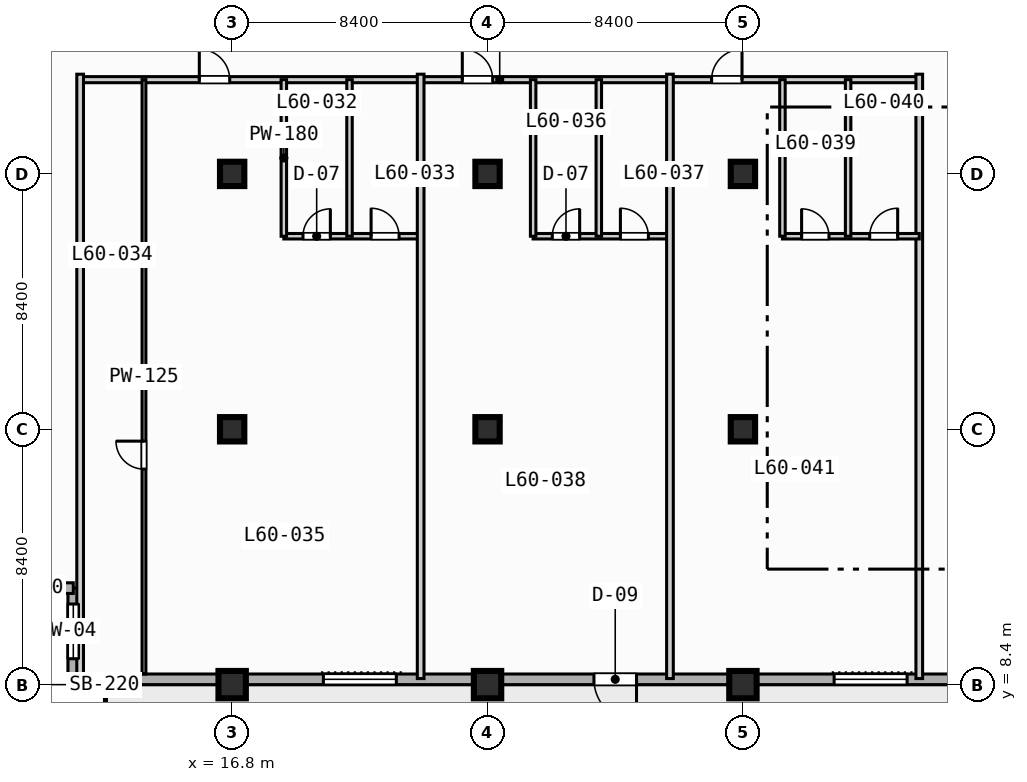
"""IFC4 building model, lengths in metres.
Left out: names, types, materials, properties, quantities, classifications, styles, units other than length and angle.
Written with IfcOpenShell. Run it as: python <this file> out.ifc"""

import sys

from ifc_helpers import new_model, si_unit, direction, frame, frame_2d, origin, origin_2d, place, context, subcontext, project, spatial, rectangle, extrude, element, fill, save


model = new_model("IFC4")
c1 = context("Model", 3, precision=1e-05, world=origin(), true_north=direction((0.0, 1.0)))
c2 = subcontext(c1, "Body", "Model", "MODEL_VIEW")
j1 = project(units=[si_unit("LENGTHUNIT", "METRE"), si_unit("PLANEANGLEUNIT", "RADIAN")], contexts=[c1])
p1 = place(None, origin())
s1 = spatial("IfcSite", under=j1, at=p1, CompositionType="ELEMENT")
p2 = place(p1, origin())
s2 = spatial("IfcBuilding", under=s1, at=p2, CompositionType="ELEMENT")
p3 = place(p2, frame((0.0, 0.0, 245.3)))
s3 = spatial("IfcBuildingStorey", under=s2, at=p3, CompositionType="ELEMENT", Elevation=245.3)
p4 = place(p3, frame((16.8, 8.4, 0.0), z_axis=(0.0, 0.0, 1.0), x_axis=(1.0, 0.0, 0.0)))
e1 = element("IfcColumn", 1, at=p4, inside=s3, PredefinedType="COLUMN", context=c2, shape_type="SweptSolid", body=[
    extrude(rectangle(XDim=0.9, YDim=0.9, at=origin_2d()), origin(), (0.0, 0.0, 1.0), 3.7),
])
for number, where, z_axis, x_axis in (
    (2, (16.8, 16.8, 0.0), (0.0, 0.0, 1.0), (1.0, 0.0, 0.0)),
    (3, (16.8, 25.2, 0.0), (0.0, 0.0, 1.0), (1.0, 0.0, 0.0)),
):
    element("IfcColumn", number, at=place(p3, frame(where, z_axis=z_axis, x_axis=x_axis)), inside=s3, PredefinedType="COLUMN", context=c2, shape_type="SweptSolid", body=[
        extrude(rectangle(XDim=0.8, YDim=0.8, at=origin_2d()), origin(), (0.0, 0.0, 1.0), 3.7),
    ])
p5 = place(p3, frame((25.2, 8.4, 0.0), z_axis=(0.0, 0.0, 1.0), x_axis=(1.0, 0.0, 0.0)))
e4 = element("IfcColumn", 4, at=p5, inside=s3, PredefinedType="COLUMN", context=c2, shape_type="SweptSolid", body=[
    extrude(rectangle(XDim=0.9, YDim=0.9, at=origin_2d()), origin(), (0.0, 0.0, 1.0), 3.7),
])
for number, where, z_axis, x_axis in (
    (5, (25.2, 16.8, 0.0), (0.0, 0.0, 1.0), (1.0, 0.0, 0.0)),
    (6, (25.2, 25.2, 0.0), (0.0, 0.0, 1.0), (1.0, 0.0, 0.0)),
):
    element("IfcColumn", number, at=place(p3, frame(where, z_axis=z_axis, x_axis=x_axis)), inside=s3, PredefinedType="COLUMN", context=c2, shape_type="SweptSolid", body=[
        extrude(rectangle(XDim=0.8, YDim=0.8, at=origin_2d()), origin(), (0.0, 0.0, 1.0), 3.7),
    ])
p6 = place(p3, frame((33.6, 8.4, 0.0), z_axis=(0.0, 0.0, 1.0), x_axis=(1.0, 0.0, 0.0)))
e7 = element("IfcColumn", 7, at=p6, inside=s3, PredefinedType="COLUMN", context=c2, shape_type="SweptSolid", body=[
    extrude(rectangle(XDim=0.9, YDim=0.9, at=origin_2d()), origin(), (0.0, 0.0, 1.0), 3.7),
])
for number, where, z_axis, x_axis in (
    (8, (33.6, 16.8, 0.0), (0.0, 0.0, 1.0), (1.0, 0.0, 0.0)),
    (9, (33.6, 25.2, 0.0), (0.0, 0.0, 1.0), (1.0, 0.0, 0.0)),
):
    element("IfcColumn", number, at=place(p3, frame(where, z_axis=z_axis, x_axis=x_axis)), inside=s3, PredefinedType="COLUMN", context=c2, shape_type="SweptSolid", body=[
        extrude(rectangle(XDim=0.8, YDim=0.8, at=origin_2d()), origin(), (0.0, 0.0, 1.0), 3.7),
    ])
p7 = place(p3, frame((11.575, 8.575, 0.0), z_axis=(0.0, 0.0, 1.0), x_axis=(0.0, 1.0, 0.0)))
e10 = element("IfcWall", 10, at=p7, inside=s3, PredefinedType="STANDARD", context=c2, shape_type="SweptSolid", body=[
    extrude(rectangle(XDim=3.0, YDim=0.35, at=frame_2d((1.5, 0.0))), origin(), (0.0, 0.0, 1.0), 3.47),
])
p8 = place(p7, frame((0.677, 0.0, 0.85)))
e11 = element("IfcOpeningElement", 11, at=p8, cuts=e10, PredefinedType="OPENING", context=c2, shape_type="SweptSolid", body=[
    extrude(rectangle(XDim=1.8, YDim=1.8, at=frame_2d((0.9, 0.9))), frame((0.0, 0.185, 0.0), z_axis=(0.0, -1.0, 0.0), x_axis=(1.0, 0.0, 0.0)), (0.0, 0.0, 1.0), 0.37),
])
p9 = place(p3, frame((11.575, 11.575, 0.0), z_axis=(0.0, 0.0, 1.0), x_axis=(-1.0, 0.0, 0.0)))
e12 = element("IfcWall", 12, at=p9, inside=s3, PredefinedType="STANDARD", context=c2, shape_type="SweptSolid", body=[
    extrude(rectangle(XDim=3.0, YDim=0.35, at=frame_2d((1.5, 0.0))), origin(), (0.0, 0.0, 1.0), 3.47),
])
p10 = place(p3, frame((72.425, 8.575, 0.0), z_axis=(0.0, 0.0, 1.0), x_axis=(-1.0, 0.0, 0.0)))
e13 = element("IfcWall", 13, at=p10, inside=s3, PredefinedType="STANDARD", context=c2, shape_type="SweptSolid", body=[
    extrude(rectangle(XDim=60.85, YDim=0.35, at=frame_2d((30.425, 0.0))), origin(), (0.0, 0.0, 1.0), 3.47),
])
p11 = place(p10, frame((42.325, 0.0, 0.0)))
e14 = element("IfcOpeningElement", 14, at=p11, cuts=e13, PredefinedType="OPENING", context=c2, shape_type="SweptSolid", body=[
    extrude(rectangle(XDim=1.4, YDim=2.2, at=frame_2d((0.7, 1.1))), frame((0.0, 0.185, 0.0), z_axis=(0.0, -1.0, 0.0), x_axis=(1.0, 0.0, 0.0)), (0.0, 0.0, 1.0), 0.37),
])
p12 = place(p10, frame((50.225, 0.0, 0.85)))
e15 = element("IfcOpeningElement", 15, at=p12, cuts=e13, PredefinedType="OPENING", context=c2, shape_type="SweptSolid", body=[
    extrude(rectangle(XDim=2.4, YDim=1.95, at=frame_2d((1.2, 0.975))), frame((0.0, 0.185, 0.0), z_axis=(0.0, -1.0, 0.0), x_axis=(1.0, 0.0, 0.0)), (0.0, 0.0, 1.0), 0.37),
])
p13 = place(p10, frame((33.425, 0.0, 0.85)))
e16 = element("IfcOpeningElement", 16, at=p13, cuts=e13, PredefinedType="OPENING", context=c2, shape_type="SweptSolid", body=[
    extrude(rectangle(XDim=2.4, YDim=1.95, at=frame_2d((1.2, 0.975))), frame((0.0, 0.185, 0.0), z_axis=(0.0, -1.0, 0.0), x_axis=(1.0, 0.0, 0.0)), (0.0, 0.0, 1.0), 0.37),
])
p14 = place(p10, frame((25.325, 0.0, 0.85)))
e17 = element("IfcOpeningElement", 17, at=p14, cuts=e13, PredefinedType="OPENING", context=c2, shape_type="SweptSolid", body=[
    extrude(rectangle(XDim=1.8, YDim=1.8, at=frame_2d((0.9, 0.9))), frame((0.0, 0.185, 0.0), z_axis=(0.0, -1.0, 0.0), x_axis=(1.0, 0.0, 0.0)), (0.0, 0.0, 1.0), 0.37),
])
p15 = place(p10, frame((58.675, 0.0, 0.85)))
e18 = element("IfcOpeningElement", 18, at=p15, cuts=e13, PredefinedType="OPENING", context=c2, shape_type="SweptSolid", body=[
    extrude(rectangle(XDim=1.8, YDim=1.8, at=frame_2d((0.9, 0.9))), frame((0.0, 0.185, 0.0), z_axis=(0.0, -1.0, 0.0), x_axis=(1.0, 0.0, 0.0)), (0.0, 0.0, 1.0), 0.37),
])
p16 = place(p3, frame((11.8, 28.3, 0.0), z_axis=(0.0, 0.0, 1.0), x_axis=(1.0, 0.0, 0.0)))
e19 = element("IfcWall", 19, at=p16, inside=s3, PredefinedType="PARTITIONING", context=c2, shape_type="SweptSolid", body=[
    extrude(rectangle(XDim=27.6, YDim=0.2, at=frame_2d((13.8, 0.0))), origin(), (0.0, 0.0, 1.0), 3.47),
])
p17 = place(p16, frame((3.92, 0.0, 0.0)))
e20 = element("IfcOpeningElement", 20, at=p17, cuts=e19, PredefinedType="OPENING", context=c2, shape_type="SweptSolid", body=[
    extrude(rectangle(XDim=1.0, YDim=2.15, at=frame_2d((0.5, 1.075))), frame((0.0, 0.11, 0.0), z_axis=(0.0, -1.0, 0.0), x_axis=(1.0, 0.0, 0.0)), (0.0, 0.0, 1.0), 0.22),
])
p18 = place(p16, frame((12.57, 0.0, 0.0)))
e21 = element("IfcOpeningElement", 21, at=p18, cuts=e19, PredefinedType="OPENING", context=c2, shape_type="SweptSolid", body=[
    extrude(rectangle(XDim=1.0, YDim=2.15, at=frame_2d((0.5, 1.075))), frame((0.0, 0.11, 0.0), z_axis=(0.0, -1.0, 0.0), x_axis=(1.0, 0.0, 0.0)), (0.0, 0.0, 1.0), 0.22),
])
p19 = place(p16, frame((20.77, 0.0, 0.0)))
e22 = element("IfcOpeningElement", 22, at=p19, cuts=e19, PredefinedType="OPENING", context=c2, shape_type="SweptSolid", body=[
    extrude(rectangle(XDim=1.0, YDim=2.15, at=frame_2d((0.5, 1.075))), frame((0.0, 0.11, 0.0), z_axis=(0.0, -1.0, 0.0), x_axis=(1.0, 0.0, 0.0)), (0.0, 0.0, 1.0), 0.22),
])
p20 = place(p3, frame((11.8, 8.6, 0.0), z_axis=(0.0, 0.0, 1.0), x_axis=(0.0, 1.0, 0.0)))
e23 = element("IfcWall", 23, at=p20, inside=s3, PredefinedType="PARTITIONING", context=c2, shape_type="SweptSolid", body=[
    extrude(rectangle(XDim=19.88, YDim=0.22, at=frame_2d((9.94, 0.0))), origin(), (0.0, 0.0, 1.0), 3.47),
])
p21 = place(p3, frame((18.5, 23.15, 0.0), z_axis=(0.0, 0.0, 1.0), x_axis=(1.0, 0.0, 0.0)))
e24 = element("IfcWall", 24, at=p21, inside=s3, PredefinedType="PLUMBINGWALL", context=c2, shape_type="SweptSolid", body=[
    extrude(rectangle(XDim=4.5, YDim=0.18, at=frame_2d((2.25, 0.0))), origin(), (0.0, 0.0, 1.0), 3.47),
])
p22 = place(p21, frame((0.63, 0.0, 0.0)))
e25 = element("IfcOpeningElement", 25, at=p22, cuts=e24, PredefinedType="OPENING", context=c2, shape_type="SweptSolid", body=[
    extrude(rectangle(XDim=0.9, YDim=2.1, at=frame_2d((0.45, 1.05))), frame((0.0, 0.1, 0.0), z_axis=(0.0, -1.0, 0.0), x_axis=(1.0, 0.0, 0.0)), (0.0, 0.0, 1.0), 0.2),
])
p23 = place(p21, frame((2.87, 0.0, 0.0)))
e26 = element("IfcOpeningElement", 26, at=p23, cuts=e24, PredefinedType="OPENING", context=c2, shape_type="SweptSolid", body=[
    extrude(rectangle(XDim=0.92, YDim=2.1, at=frame_2d((0.46, 1.05))), frame((0.0, 0.1, 0.0), z_axis=(0.0, -1.0, 0.0), x_axis=(1.0, 0.0, 0.0)), (0.0, 0.0, 1.0), 0.2),
])
for number, where, z_axis, x_axis in (
    (27, (18.5, 23.15, 0.0), (0.0, 0.0, 1.0), (0.0, 1.0, 0.0)),
    (28, (20.66, 23.15, 0.0), (0.0, 0.0, 1.0), (0.0, 1.0, 0.0)),
):
    element("IfcWall", number, at=place(p3, frame(where, z_axis=z_axis, x_axis=x_axis)), inside=s3, PredefinedType="PLUMBINGWALL", context=c2, shape_type="SweptSolid", body=[
        extrude(rectangle(XDim=5.15, YDim=0.18, at=frame_2d((2.575, 0.0))), origin(), (0.0, 0.0, 1.0), 3.47),
    ])
p24 = place(p3, frame((13.9, 8.75, 0.0), z_axis=(0.0, 0.0, 1.0), x_axis=(0.0, 1.0, 0.0)))
e29 = element("IfcWall", 29, at=p24, inside=s3, PredefinedType="PARTITIONING", context=c2, shape_type="SweptSolid", body=[
    extrude(rectangle(XDim=19.55, YDim=0.125, at=frame_2d((9.775, 0.0))), origin(), (0.0, 0.0, 1.0), 3.47),
])
p25 = place(p24, frame((6.74, 0.0, 0.0)))
e30 = element("IfcOpeningElement", 30, at=p25, cuts=e29, PredefinedType="OPENING", context=c2, shape_type="SweptSolid", body=[
    extrude(rectangle(XDim=0.92, YDim=2.1, at=frame_2d((0.46, 1.05))), frame((0.0, 0.073, 0.0), z_axis=(0.0, -1.0, 0.0), x_axis=(1.0, 0.0, 0.0)), (0.0, 0.0, 1.0), 0.145),
])
p26 = place(p3, frame((23.0, 8.6, 0.0), z_axis=(0.0, 0.0, 1.0), x_axis=(0.0, 1.0, 0.0)))
e31 = element("IfcWall", 31, at=p26, inside=s3, PredefinedType="PARTITIONING", context=c2, shape_type="SweptSolid", body=[
    extrude(rectangle(XDim=19.88, YDim=0.22, at=frame_2d((9.94, 0.0))), origin(), (0.0, 0.0, 1.0), 3.47),
])
p27 = place(p3, frame((26.7, 23.15, 0.0), z_axis=(0.0, 0.0, 1.0), x_axis=(1.0, 0.0, 0.0)))
e32 = element("IfcWall", 32, at=p27, inside=s3, PredefinedType="PLUMBINGWALL", context=c2, shape_type="SweptSolid", body=[
    extrude(rectangle(XDim=4.5, YDim=0.18, at=frame_2d((2.25, 0.0))), origin(), (0.0, 0.0, 1.0), 3.47),
])
p28 = place(p27, frame((0.63, 0.0, 0.0)))
e33 = element("IfcOpeningElement", 33, at=p28, cuts=e32, PredefinedType="OPENING", context=c2, shape_type="SweptSolid", body=[
    extrude(rectangle(XDim=0.9, YDim=2.1, at=frame_2d((0.45, 1.05))), frame((0.0, 0.1, 0.0), z_axis=(0.0, -1.0, 0.0), x_axis=(1.0, 0.0, 0.0)), (0.0, 0.0, 1.0), 0.2),
])
p29 = place(p27, frame((2.87, 0.0, 0.0)))
e34 = element("IfcOpeningElement", 34, at=p29, cuts=e32, PredefinedType="OPENING", context=c2, shape_type="SweptSolid", body=[
    extrude(rectangle(XDim=0.92, YDim=2.1, at=frame_2d((0.46, 1.05))), frame((0.0, 0.1, 0.0), z_axis=(0.0, -1.0, 0.0), x_axis=(1.0, 0.0, 0.0)), (0.0, 0.0, 1.0), 0.2),
])
for number, where, z_axis, x_axis in (
    (35, (26.7, 23.15, 0.0), (0.0, 0.0, 1.0), (0.0, 1.0, 0.0)),
    (36, (28.86, 23.15, 0.0), (0.0, 0.0, 1.0), (0.0, 1.0, 0.0)),
):
    element("IfcWall", number, at=place(p3, frame(where, z_axis=z_axis, x_axis=x_axis)), inside=s3, PredefinedType="PLUMBINGWALL", context=c2, shape_type="SweptSolid", body=[
        extrude(rectangle(XDim=5.15, YDim=0.18, at=frame_2d((2.575, 0.0))), origin(), (0.0, 0.0, 1.0), 3.47),
    ])
for number, where, z_axis, x_axis in (
    (37, (31.2, 8.6, 0.0), (0.0, 0.0, 1.0), (0.0, 1.0, 0.0)),
    (38, (39.4, 8.6, 0.0), (0.0, 0.0, 1.0), (0.0, 1.0, 0.0)),
):
    element("IfcWall", number, at=place(p3, frame(where, z_axis=z_axis, x_axis=x_axis)), inside=s3, PredefinedType="PARTITIONING", context=c2, shape_type="SweptSolid", body=[
        extrude(rectangle(XDim=19.88, YDim=0.22, at=frame_2d((9.94, 0.0))), origin(), (0.0, 0.0, 1.0), 3.47),
    ])
p30 = place(p3, frame((34.9, 23.15, 0.0), z_axis=(0.0, 0.0, 1.0), x_axis=(1.0, 0.0, 0.0)))
e39 = element("IfcWall", 39, at=p30, inside=s3, PredefinedType="PLUMBINGWALL", context=c2, shape_type="SweptSolid", body=[
    extrude(rectangle(XDim=4.5, YDim=0.18, at=frame_2d((2.25, 0.0))), origin(), (0.0, 0.0, 1.0), 3.47),
])
p31 = place(p30, frame((0.63, 0.0, 0.0)))
e40 = element("IfcOpeningElement", 40, at=p31, cuts=e39, PredefinedType="OPENING", context=c2, shape_type="SweptSolid", body=[
    extrude(rectangle(XDim=0.9, YDim=2.1, at=frame_2d((0.45, 1.05))), frame((0.0, 0.1, 0.0), z_axis=(0.0, -1.0, 0.0), x_axis=(1.0, 0.0, 0.0)), (0.0, 0.0, 1.0), 0.2),
])
p32 = place(p30, frame((2.87, 0.0, 0.0)))
e41 = element("IfcOpeningElement", 41, at=p32, cuts=e39, PredefinedType="OPENING", context=c2, shape_type="SweptSolid", body=[
    extrude(rectangle(XDim=0.92, YDim=2.1, at=frame_2d((0.46, 1.05))), frame((0.0, 0.1, 0.0), z_axis=(0.0, -1.0, 0.0), x_axis=(1.0, 0.0, 0.0)), (0.0, 0.0, 1.0), 0.2),
])
for number, where, z_axis, x_axis in (
    (42, (34.9, 23.15, 0.0), (0.0, 0.0, 1.0), (0.0, 1.0, 0.0)),
    (43, (37.06, 23.15, 0.0), (0.0, 0.0, 1.0), (0.0, 1.0, 0.0)),
):
    element("IfcWall", number, at=place(p3, frame(where, z_axis=z_axis, x_axis=x_axis)), inside=s3, PredefinedType="PLUMBINGWALL", context=c2, shape_type="SweptSolid", body=[
        extrude(rectangle(XDim=5.15, YDim=0.18, at=frame_2d((2.575, 0.0))), origin(), (0.0, 0.0, 1.0), 3.47),
    ])
p33 = place(p8, origin())
e44 = element("IfcWindow", 44, at=p33, inside=s3, PartitioningType="SINGLE_PANEL", PredefinedType="WINDOW", context=c2, shape_type="SweptSolid", body=[
    extrude(rectangle(XDim=1.8, YDim=1.8, at=frame_2d((0.9, 0.9))), frame((0.0, 0.03, 0.0), z_axis=(0.0, -1.0, 0.0), x_axis=(1.0, 0.0, 0.0)), (0.0, 0.0, 1.0), 0.06),
])
fill(e11, e44)
p34 = place(p11, origin())
e45 = element("IfcDoor", 45, at=p34, inside=s3, OperationType="SINGLE_SWING_LEFT", PredefinedType="DOOR", context=c2, shape_type="SweptSolid", body=[
    extrude(rectangle(XDim=1.4, YDim=2.2, at=frame_2d((0.7, 1.1))), frame((0.0, 0.025, 0.0), z_axis=(0.0, -1.0, 0.0), x_axis=(1.0, 0.0, 0.0)), (0.0, 0.0, 1.0), 0.05),
])
fill(e14, e45)
p35 = place(p12, origin())
e46 = element("IfcWindow", 46, at=p35, inside=s3, PartitioningType="SINGLE_PANEL", PredefinedType="WINDOW", context=c2, shape_type="SweptSolid", body=[
    extrude(rectangle(XDim=2.4, YDim=1.95, at=frame_2d((1.2, 0.975))), frame((0.0, 0.03, 0.0), z_axis=(0.0, -1.0, 0.0), x_axis=(1.0, 0.0, 0.0)), (0.0, 0.0, 1.0), 0.06),
])
fill(e15, e46)
p36 = place(p13, origin())
e47 = element("IfcWindow", 47, at=p36, inside=s3, PartitioningType="SINGLE_PANEL", PredefinedType="WINDOW", context=c2, shape_type="SweptSolid", body=[
    extrude(rectangle(XDim=2.4, YDim=1.95, at=frame_2d((1.2, 0.975))), frame((0.0, 0.03, 0.0), z_axis=(0.0, -1.0, 0.0), x_axis=(1.0, 0.0, 0.0)), (0.0, 0.0, 1.0), 0.06),
])
fill(e16, e47)
p37 = place(p15, origin())
e48 = element("IfcWindow", 48, at=p37, inside=s3, PartitioningType="SINGLE_PANEL", PredefinedType="WINDOW", context=c2, shape_type="SweptSolid", body=[
    extrude(rectangle(XDim=1.8, YDim=1.8, at=frame_2d((0.9, 0.9))), frame((0.0, 0.03, 0.0), z_axis=(0.0, -1.0, 0.0), x_axis=(1.0, 0.0, 0.0)), (0.0, 0.0, 1.0), 0.06),
])
fill(e18, e48)
p38 = place(p17, origin())
e49 = element("IfcDoor", 49, at=p38, inside=s3, OperationType="SINGLE_SWING_LEFT", PredefinedType="DOOR", context=c2, shape_type="SweptSolid", body=[
    extrude(rectangle(XDim=1.0, YDim=2.15, at=frame_2d((0.5, 1.075))), frame((0.0, 0.025, 0.0), z_axis=(0.0, -1.0, 0.0), x_axis=(1.0, 0.0, 0.0)), (0.0, 0.0, 1.0), 0.05),
])
fill(e20, e49)
p39 = place(p18, origin())
e50 = element("IfcDoor", 50, at=p39, inside=s3, OperationType="SINGLE_SWING_LEFT", PredefinedType="DOOR", context=c2, shape_type="SweptSolid", body=[
    extrude(rectangle(XDim=1.0, YDim=2.15, at=frame_2d((0.5, 1.075))), frame((0.0, 0.025, 0.0), z_axis=(0.0, -1.0, 0.0), x_axis=(1.0, 0.0, 0.0)), (0.0, 0.0, 1.0), 0.05),
])
fill(e21, e50)
p40 = place(p19, origin())
e51 = element("IfcDoor", 51, at=p40, inside=s3, OperationType="SINGLE_SWING_RIGHT", PredefinedType="DOOR", context=c2, shape_type="SweptSolid", body=[
    extrude(rectangle(XDim=1.0, YDim=2.15, at=frame_2d((0.5, 1.075))), frame((0.0, 0.025, 0.0), z_axis=(0.0, -1.0, 0.0), x_axis=(1.0, 0.0, 0.0)), (0.0, 0.0, 1.0), 0.05),
])
fill(e22, e51)
p41 = place(p22, origin())
e52 = element("IfcDoor", 52, at=p41, inside=s3, OperationType="SINGLE_SWING_RIGHT", PredefinedType="DOOR", context=c2, shape_type="SweptSolid", body=[
    extrude(rectangle(XDim=0.9, YDim=2.1, at=frame_2d((0.45, 1.05))), frame((0.0, 0.025, 0.0), z_axis=(0.0, -1.0, 0.0), x_axis=(1.0, 0.0, 0.0)), (0.0, 0.0, 1.0), 0.05),
])
fill(e25, e52)
p42 = place(p23, origin())
e53 = element("IfcDoor", 53, at=p42, inside=s3, OperationType="SINGLE_SWING_LEFT", PredefinedType="DOOR", context=c2, shape_type="SweptSolid", body=[
    extrude(rectangle(XDim=0.92, YDim=2.1, at=frame_2d((0.46, 1.05))), frame((0.0, 0.025, 0.0), z_axis=(0.0, -1.0, 0.0), x_axis=(1.0, 0.0, 0.0)), (0.0, 0.0, 1.0), 0.05),
])
fill(e26, e53)
p43 = place(p25, origin())
e54 = element("IfcDoor", 54, at=p43, inside=s3, OperationType="SINGLE_SWING_RIGHT", PredefinedType="DOOR", context=c2, shape_type="SweptSolid", body=[
    extrude(rectangle(XDim=0.92, YDim=2.1, at=frame_2d((0.46, 1.05))), frame((0.0, 0.025, 0.0), z_axis=(0.0, -1.0, 0.0), x_axis=(1.0, 0.0, 0.0)), (0.0, 0.0, 1.0), 0.05),
])
fill(e30, e54)
p44 = place(p28, origin())
e55 = element("IfcDoor", 55, at=p44, inside=s3, OperationType="SINGLE_SWING_RIGHT", PredefinedType="DOOR", context=c2, shape_type="SweptSolid", body=[
    extrude(rectangle(XDim=0.9, YDim=2.1, at=frame_2d((0.45, 1.05))), frame((0.0, 0.025, 0.0), z_axis=(0.0, -1.0, 0.0), x_axis=(1.0, 0.0, 0.0)), (0.0, 0.0, 1.0), 0.05),
])
fill(e33, e55)
p45 = place(p29, origin())
e56 = element("IfcDoor", 56, at=p45, inside=s3, OperationType="SINGLE_SWING_LEFT", PredefinedType="DOOR", context=c2, shape_type="SweptSolid", body=[
    extrude(rectangle(XDim=0.92, YDim=2.1, at=frame_2d((0.46, 1.05))), frame((0.0, 0.025, 0.0), z_axis=(0.0, -1.0, 0.0), x_axis=(1.0, 0.0, 0.0)), (0.0, 0.0, 1.0), 0.05),
])
fill(e34, e56)
p46 = place(p31, origin())
e57 = element("IfcDoor", 57, at=p46, inside=s3, OperationType="SINGLE_SWING_LEFT", PredefinedType="DOOR", context=c2, shape_type="SweptSolid", body=[
    extrude(rectangle(XDim=0.9, YDim=2.1, at=frame_2d((0.45, 1.05))), frame((0.0, 0.025, 0.0), z_axis=(0.0, -1.0, 0.0), x_axis=(1.0, 0.0, 0.0)), (0.0, 0.0, 1.0), 0.05),
])
fill(e40, e57)
p47 = place(p32, origin())
e58 = element("IfcDoor", 58, at=p47, inside=s3, OperationType="SINGLE_SWING_RIGHT", PredefinedType="DOOR", context=c2, shape_type="SweptSolid", body=[
    extrude(rectangle(XDim=0.92, YDim=2.1, at=frame_2d((0.46, 1.05))), frame((0.0, 0.025, 0.0), z_axis=(0.0, -1.0, 0.0), x_axis=(1.0, 0.0, 0.0)), (0.0, 0.0, 1.0), 0.05),
])
fill(e41, e58)
save(model, sys.argv[1])
